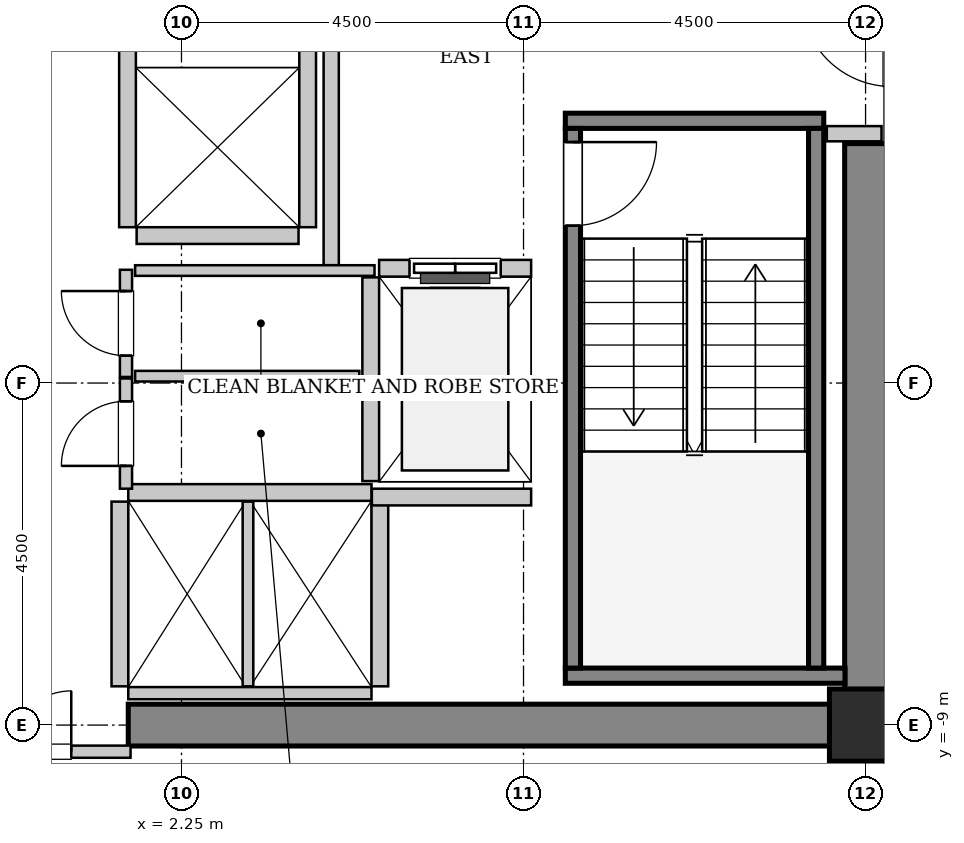
"""IFC4 building model, lengths in metres.
Left out: names, types, materials, properties, quantities, classifications, styles, units other than length and angle.
Written with IfcOpenShell. Run it as: python <this file> out.ifc"""

import sys

from ifc_helpers import new_model, si_unit, direction, frame, frame_2d, origin, origin_2d, place, context, subcontext, project, spatial, rectangle, hollow_rectangle, extrude, source, transform, mapped, element, fill, save


model = new_model("IFC4")
c1 = context("Model", 3, precision=1e-05, world=origin(), true_north=direction((0.0, 1.0)))
c2 = subcontext(c1, "Body", "Model", "MODEL_VIEW")
j1 = project(units=[si_unit("LENGTHUNIT", "METRE"), si_unit("PLANEANGLEUNIT", "RADIAN")], contexts=[c1])
p1 = place(None, origin())
s1 = spatial("IfcSite", under=j1, at=p1, CompositionType="ELEMENT")
p2 = place(p1, origin())
s2 = spatial("IfcBuilding", under=s1, at=p2, CompositionType="ELEMENT")
p3 = place(p2, frame((0.0, 0.0, 94.6)))
s3 = spatial("IfcBuildingStorey", under=s2, at=p3, CompositionType="ELEMENT", Elevation=94.6)
m1 = source(origin(), c2, "Body", "SweptSolid", [
    extrude(rectangle(XDim=9.975, YDim=0.55, at=frame_2d((4.987, 0.0))), origin(), (0.0, 0.0, 1.0), 3.8),
])
p4 = place(p3, frame((1.55, -9.0, 0.0), z_axis=(0.0, 0.0, 1.0), x_axis=(1.0, 0.0, 0.0)))
e1 = element("IfcWall", 1, at=p4, inside=s3, PredefinedType="SHEAR", context=c2, shape_type="MappedRepresentation", body=[
    mapped(m1, transform((0.0, 0.0, 0.0), x_axis=(1.0, 0.0, 0.0), y_axis=(0.0, 1.0, 0.0), z_axis=(0.0, 0.0, 1.0), scale=1.0)),
])
m2 = source(origin(), c2, "Body", "SweptSolid", [
    extrude(rectangle(XDim=7.375, YDim=0.55, at=frame_2d((3.688, 0.0))), origin(), (0.0, 0.0, 1.0), 3.8),
])
p5 = place(p3, frame((11.25, -8.725, 0.0), z_axis=(0.0, 0.0, 1.0), x_axis=(0.0, 1.0, 0.0)))
e2 = element("IfcWall", 2, at=p5, inside=s3, PredefinedType="SHEAR", context=c2, shape_type="MappedRepresentation", body=[
    mapped(m2, transform((0.0, 0.0, 0.0), x_axis=(1.0, 0.0, 0.0), y_axis=(0.0, 1.0, 0.0), z_axis=(0.0, 0.0, 1.0), scale=1.0)),
])
m3 = source(origin(), c2, "Body", "SweptSolid", [
    extrude(hollow_rectangle(XDim=0.95, YDim=0.95, WallThickness=0.045, InnerFilletRadius=0.045, OuterFilletRadius=0.09, at=origin_2d()), origin(), (0.0, 0.0, 1.0), 3.8),
])
p6 = place(p3, frame((11.25, -9.0, 0.0), z_axis=(0.0, 0.0, 1.0), x_axis=(1.0, 0.0, 0.0)))
e3 = element("IfcColumn", 3, at=p6, inside=s3, PredefinedType="COLUMN", context=c2, shape_type="MappedRepresentation", body=[
    mapped(m3, transform((0.0, 0.0, 0.0), x_axis=(1.0, 0.0, 0.0), y_axis=(0.0, 1.0, 0.0), z_axis=(0.0, 0.0, 1.0), scale=1.0)),
])
m4 = source(origin(), c2, "Body", "SweptSolid", [
    extrude(rectangle(XDim=3.4, YDim=0.2, at=frame_2d((1.7, 0.0))), origin(), (0.0, 0.0, 1.0), 3.8),
])
p7 = place(p3, frame((7.3, -1.05, 0.0), z_axis=(0.0, 0.0, 1.0), x_axis=(1.0, 0.0, 0.0)))
e4 = element("IfcWall", 4, at=p7, inside=s3, PredefinedType="SOLIDWALL", context=c2, shape_type="MappedRepresentation", body=[
    mapped(m4, transform((0.0, 0.0, 0.0), x_axis=(1.0, 0.0, 0.0), y_axis=(0.0, 1.0, 0.0), z_axis=(0.0, 0.0, 1.0), scale=1.0)),
])
m5 = source(origin(), c2, "Body", "SweptSolid", [
    extrude(rectangle(XDim=3.68, YDim=0.2, at=frame_2d((1.84, 0.0))), origin(), (0.0, 0.0, 1.0), 3.8),
])
p8 = place(p3, frame((7.3, -8.35, 0.0), z_axis=(0.0, 0.0, 1.0), x_axis=(1.0, 0.0, 0.0)))
e5 = element("IfcWall", 5, at=p8, inside=s3, PredefinedType="SOLIDWALL", context=c2, shape_type="MappedRepresentation", body=[
    mapped(m5, transform((0.0, 0.0, 0.0), x_axis=(1.0, 0.0, 0.0), y_axis=(0.0, 1.0, 0.0), z_axis=(0.0, 0.0, 1.0), scale=1.0)),
])
m6 = source(origin(), c2, "Body", "SweptSolid", [
    extrude(rectangle(XDim=7.1, YDim=0.2, at=frame_2d((3.55, 0.0))), origin(), (0.0, 0.0, 1.0), 3.8),
])
p9 = place(p3, frame((7.4, -1.15, 0.0), z_axis=(0.0, 0.0, 1.0), x_axis=(0.0, -1.0, 0.0)))
e6 = element("IfcWall", 6, at=p9, inside=s3, PredefinedType="SOLIDWALL", context=c2, shape_type="MappedRepresentation", body=[
    mapped(m6, transform((0.0, 0.0, 0.0), x_axis=(1.0, 0.0, 0.0), y_axis=(0.0, 1.0, 0.0), z_axis=(0.0, 0.0, 1.0), scale=1.0)),
])
p10 = place(p9, frame((0.18, 0.0, 0.0)))
e7 = element("IfcOpeningElement", 7, at=p10, cuts=e6, PredefinedType="OPENING", context=c2, shape_type="SweptSolid", body=[
    extrude(rectangle(XDim=1.1, YDim=2.15, at=frame_2d((0.55, 1.075))), frame((0.0, 0.11, 0.0), z_axis=(0.0, -1.0, 0.0), x_axis=(1.0, 0.0, 0.0)), (0.0, 0.0, 1.0), 0.22),
])
p11 = place(p3, frame((10.6, -1.15, 0.0), z_axis=(0.0, 0.0, 1.0), x_axis=(0.0, -1.0, 0.0)))
e8 = element("IfcWall", 8, at=p11, inside=s3, PredefinedType="SOLIDWALL", context=c2, shape_type="MappedRepresentation", body=[
    mapped(m6, transform((0.0, 0.0, 0.0), x_axis=(1.0, 0.0, 0.0), y_axis=(0.0, 1.0, 0.0), z_axis=(0.0, 0.0, 1.0), scale=1.0)),
])
m7 = source(origin(), c2, "Body", "SweptSolid", [
    extrude(rectangle(XDim=2.0, YDim=0.22, at=frame_2d((1.0, 0.0))), origin(), (0.0, 0.0, 1.0), 3.535),
])
p12 = place(p3, frame((6.85, -2.99, 0.0), z_axis=(0.0, 0.0, 1.0), x_axis=(-1.0, 0.0, 0.0)))
e9 = element("IfcWall", 9, at=p12, inside=s3, PredefinedType="SOLIDWALL", context=c2, shape_type="MappedRepresentation", body=[
    mapped(m7, transform((0.0, 0.0, 0.0), x_axis=(1.0, 0.0, 0.0), y_axis=(0.0, 1.0, 0.0), z_axis=(0.0, 0.0, 1.0), scale=1.0)),
])
p13 = place(p12, frame((0.4, 0.0, 0.0)))
e10 = element("IfcOpeningElement", 10, at=p13, cuts=e9, PredefinedType="OPENING", context=c2, shape_type="SweptSolid", body=[
    extrude(rectangle(XDim=1.2, YDim=2.2, at=frame_2d((0.6, 1.1))), frame((0.0, 0.12, 0.0), z_axis=(0.0, -1.0, 0.0), x_axis=(1.0, 0.0, 0.0)), (0.0, 0.0, 1.0), 0.24),
])
m8 = source(origin(), c2, "Body", "SweptSolid", [
    extrude(rectangle(XDim=2.68, YDim=0.22, at=frame_2d((1.34, 0.0))), origin(), (0.0, 0.0, 1.0), 3.535),
])
p14 = place(p3, frame((4.74, -3.11, 0.0), z_axis=(0.0, 0.0, 1.0), x_axis=(0.0, -1.0, 0.0)))
e11 = element("IfcWall", 11, at=p14, inside=s3, PredefinedType="SOLIDWALL", context=c2, shape_type="MappedRepresentation", body=[
    mapped(m8, transform((0.0, 0.0, 0.0), x_axis=(1.0, 0.0, 0.0), y_axis=(0.0, 1.0, 0.0), z_axis=(0.0, 0.0, 1.0), scale=1.0)),
])
m9 = source(origin(), c2, "Body", "SweptSolid", [
    extrude(rectangle(XDim=3.2, YDim=0.22, at=frame_2d((1.6, 0.0))), origin(), (0.0, 0.0, 1.0), 3.535),
])
p15 = place(p3, frame((4.75, -5.94, 0.0), z_axis=(0.0, 0.0, 1.0), x_axis=(-1.0, 0.0, 0.0)))
e12 = element("IfcWall", 12, at=p15, inside=s3, PredefinedType="SOLIDWALL", context=c2, shape_type="MappedRepresentation", body=[
    mapped(m9, transform((0.0, 0.0, 0.0), x_axis=(1.0, 0.0, 0.0), y_axis=(0.0, 1.0, 0.0), z_axis=(0.0, 0.0, 1.0), scale=1.0)),
])
m10 = source(origin(), c2, "Body", "SweptSolid", [
    extrude(rectangle(XDim=3.2, YDim=0.16, at=frame_2d((1.6, 0.0))), origin(), (0.0, 0.0, 1.0), 2.425),
])
p16 = place(p3, frame((1.55, -8.58, 0.0), z_axis=(0.0, 0.0, 1.0), x_axis=(1.0, 0.0, 0.0)))
e13 = element("IfcWall", 13, at=p16, inside=s3, PredefinedType="PARTITIONING", context=c2, shape_type="MappedRepresentation", body=[
    mapped(m10, transform((0.0, 0.0, 0.0), x_axis=(1.0, 0.0, 0.0), y_axis=(0.0, 1.0, 0.0), z_axis=(0.0, 0.0, 1.0), scale=1.0)),
])
m11 = source(origin(), c2, "Body", "SweptSolid", [
    extrude(rectangle(XDim=2.43, YDim=0.22, at=frame_2d((1.215, 0.0))), origin(), (0.0, 0.0, 1.0), 3.535),
])
p17 = place(p3, frame((1.44, -6.06, 0.0), z_axis=(0.0, 0.0, 1.0), x_axis=(0.0, -1.0, 0.0)))
e14 = element("IfcWall", 14, at=p17, inside=s3, PredefinedType="SOLIDWALL", context=c2, shape_type="MappedRepresentation", body=[
    mapped(m11, transform((0.0, 0.0, 0.0), x_axis=(1.0, 0.0, 0.0), y_axis=(0.0, 1.0, 0.0), z_axis=(0.0, 0.0, 1.0), scale=1.0)),
])
m12 = source(origin(), c2, "Body", "SweptSolid", [
    extrude(rectangle(XDim=2.43, YDim=0.14, at=frame_2d((1.215, 0.0))), origin(), (0.0, 0.0, 1.0), 3.535),
])
p18 = place(p3, frame((3.125, -8.49, 0.0), z_axis=(0.0, 0.0, 1.0), x_axis=(0.0, 1.0, 0.0)))
e15 = element("IfcWall", 15, at=p18, inside=s3, PredefinedType="PARTITIONING", context=c2, shape_type="MappedRepresentation", body=[
    mapped(m12, transform((0.0, 0.0, 0.0), x_axis=(1.0, 0.0, 0.0), y_axis=(0.0, 1.0, 0.0), z_axis=(0.0, 0.0, 1.0), scale=1.0)),
])
p19 = place(p3, frame((4.86, -8.49, 0.0), z_axis=(0.0, 0.0, 1.0), x_axis=(0.0, 1.0, 0.0)))
e16 = element("IfcWall", 16, at=p19, inside=s3, PredefinedType="SOLIDWALL", context=c2, shape_type="MappedRepresentation", body=[
    mapped(m11, transform((0.0, 0.0, 0.0), x_axis=(1.0, 0.0, 0.0), y_axis=(0.0, 1.0, 0.0), z_axis=(0.0, 0.0, 1.0), scale=1.0)),
])
m13 = source(origin(), c2, "Body", "SweptSolid", [
    extrude(rectangle(XDim=4.9, YDim=0.22, at=frame_2d((2.45, 0.0))), origin(), (0.0, 0.0, 1.0), 3.535),
])
for number, where, z_axis, x_axis in (
    (17, (1.54, 2.45, 0.0), (0.0, 0.0, 1.0), (0.0, -1.0, 0.0)),
    (18, (3.91, -2.45, 0.0), (0.0, 0.0, 1.0), (0.0, 1.0, 0.0)),
):
    element("IfcWall", number, at=place(p3, frame(where, z_axis=z_axis, x_axis=x_axis)), inside=s3, PredefinedType="SOLIDWALL", context=c2, shape_type="MappedRepresentation", body=[
        mapped(m13, transform((0.0, 0.0, 0.0), x_axis=(1.0, 0.0, 0.0), y_axis=(0.0, 1.0, 0.0), z_axis=(0.0, 0.0, 1.0), scale=1.0)),
    ])
m14 = source(origin(), c2, "Body", "SweptSolid", [
    extrude(rectangle(XDim=2.13, YDim=0.22, at=frame_2d((1.065, 0.0))), origin(), (0.0, 0.0, 1.0), 3.535),
])
p20 = place(p3, frame((1.66, -2.56, 0.0), z_axis=(0.0, 0.0, 1.0), x_axis=(1.0, 0.0, 0.0)))
e19 = element("IfcWall", 19, at=p20, inside=s3, PredefinedType="SOLIDWALL", context=c2, shape_type="MappedRepresentation", body=[
    mapped(m14, transform((0.0, 0.0, 0.0), x_axis=(1.0, 0.0, 0.0), y_axis=(0.0, 1.0, 0.0), z_axis=(0.0, 0.0, 1.0), scale=1.0)),
])
m15 = source(origin(), c2, "Body", "SweptSolid", [
    extrude(rectangle(XDim=2.095, YDim=0.22, at=frame_2d((1.048, 0.0))), origin(), (0.0, 0.0, 1.0), 3.535),
])
p21 = place(p3, frame((4.755, -6.0, 0.0), z_axis=(0.0, 0.0, 1.0), x_axis=(1.0, 0.0, 0.0)))
e20 = element("IfcWall", 20, at=p21, inside=s3, PredefinedType="SOLIDWALL", context=c2, shape_type="MappedRepresentation", body=[
    mapped(m15, transform((0.0, 0.0, 0.0), x_axis=(1.0, 0.0, 0.0), y_axis=(0.0, 1.0, 0.0), z_axis=(0.0, 0.0, 1.0), scale=1.0)),
])
m16 = source(origin(), c2, "Body", "SweptSolid", [
    extrude(rectangle(XDim=5.9, YDim=0.2, at=frame_2d((2.95, 0.0))), origin(), (0.0, 0.0, 1.0), 3.535),
])
p22 = place(p3, frame((4.22, -2.95, 0.0), z_axis=(0.0, 0.0, 1.0), x_axis=(0.0, 1.0, 0.0)))
e21 = element("IfcWall", 21, at=p22, inside=s3, PredefinedType="PARTITIONING", context=c2, shape_type="MappedRepresentation", body=[
    mapped(m16, transform((0.0, 0.0, 0.0), x_axis=(1.0, 0.0, 0.0), y_axis=(0.0, 1.0, 0.0), z_axis=(0.0, 0.0, 1.0), scale=1.0)),
])
m17 = source(origin(), c2, "Body", "SweptSolid", [
    extrude(rectangle(XDim=0.72, YDim=0.2, at=frame_2d((0.36, 0.0))), origin(), (0.0, 0.0, 1.0), 3.535),
])
p23 = place(p3, frame((10.74, -1.22, 0.0), z_axis=(0.0, 0.0, 1.0), x_axis=(1.0, 0.0, 0.0)))
e22 = element("IfcWall", 22, at=p23, inside=s3, PredefinedType="PARTITIONING", context=c2, shape_type="MappedRepresentation", body=[
    mapped(m17, transform((0.0, 0.0, 0.0), x_axis=(1.0, 0.0, 0.0), y_axis=(0.0, 1.0, 0.0), z_axis=(0.0, 0.0, 1.0), scale=1.0)),
])
m18 = source(origin(), c2, "Body", "SweptSolid", [
    extrude(rectangle(XDim=3.16, YDim=0.16, at=frame_2d((1.58, 0.0))), origin(), (0.0, 0.0, 1.0), 2.425),
])
p24 = place(p3, frame((-1.58, -9.35, 0.0), z_axis=(0.0, 0.0, 1.0), x_axis=(1.0, 0.0, 0.0)))
e23 = element("IfcWall", 23, at=p24, inside=s3, PredefinedType="PARTITIONING", context=c2, shape_type="MappedRepresentation", body=[
    mapped(m18, transform((0.0, 0.0, 0.0), x_axis=(1.0, 0.0, 0.0), y_axis=(0.0, 1.0, 0.0), z_axis=(0.0, 0.0, 1.0), scale=1.0)),
])
p25 = place(p24, frame((0.78, 0.0, 0.0)))
e24 = element("IfcOpeningElement", 24, at=p25, cuts=e23, PredefinedType="OPENING", context=c2, shape_type="SweptSolid", body=[
    extrude(rectangle(XDim=1.6, YDim=2.3, at=frame_2d((0.8, 1.15))), frame((0.0, 0.09, 0.0), z_axis=(0.0, -1.0, 0.0), x_axis=(1.0, 0.0, 0.0)), (0.0, 0.0, 1.0), 0.18),
])
m19 = source(origin(), c2, "Body", "SweptSolid", [
    extrude(rectangle(XDim=1.41, YDim=0.16, at=frame_2d((0.705, 0.0))), origin(), (0.0, 0.0, 1.0), 3.535),
])
p26 = place(p3, frame((1.52, -4.42, 0.0), z_axis=(0.0, 0.0, 1.0), x_axis=(0.0, 1.0, 0.0)))
e25 = element("IfcWall", 25, at=p26, inside=s3, PredefinedType="PARTITIONING", context=c2, shape_type="MappedRepresentation", body=[
    mapped(m19, transform((0.0, 0.0, 0.0), x_axis=(1.0, 0.0, 0.0), y_axis=(0.0, 1.0, 0.0), z_axis=(0.0, 0.0, 1.0), scale=1.0)),
])
p27 = place(p26, frame((0.28, 0.0, 0.0)))
e26 = element("IfcOpeningElement", 26, at=p27, cuts=e25, PredefinedType="OPENING", context=c2, shape_type="SweptSolid", body=[
    extrude(rectangle(XDim=0.85, YDim=2.1, at=frame_2d((0.425, 1.05))), frame((0.0, 0.09, 0.0), z_axis=(0.0, -1.0, 0.0), x_axis=(1.0, 0.0, 0.0)), (0.0, 0.0, 1.0), 0.18),
])
m20 = source(origin(), c2, "Body", "SweptSolid", [
    extrude(rectangle(XDim=3.15, YDim=0.14, at=frame_2d((1.575, 0.0))), origin(), (0.0, 0.0, 1.0), 3.535),
])
p28 = place(p3, frame((1.64, -3.02, 0.0), z_axis=(0.0, 0.0, 1.0), x_axis=(1.0, 0.0, 0.0)))
e27 = element("IfcWall", 27, at=p28, inside=s3, PredefinedType="PARTITIONING", context=c2, shape_type="MappedRepresentation", body=[
    mapped(m20, transform((0.0, 0.0, 0.0), x_axis=(1.0, 0.0, 0.0), y_axis=(0.0, 1.0, 0.0), z_axis=(0.0, 0.0, 1.0), scale=1.0)),
])
m21 = source(origin(), c2, "Body", "SweptSolid", [
    extrude(rectangle(XDim=2.95, YDim=0.14, at=frame_2d((1.475, 0.0))), origin(), (0.0, 0.0, 1.0), 3.535),
])
p29 = place(p3, frame((1.64, -4.41, 0.0), z_axis=(0.0, 0.0, 1.0), x_axis=(1.0, 0.0, 0.0)))
e28 = element("IfcWall", 28, at=p29, inside=s3, PredefinedType="PARTITIONING", context=c2, shape_type="MappedRepresentation", body=[
    mapped(m21, transform((0.0, 0.0, 0.0), x_axis=(1.0, 0.0, 0.0), y_axis=(0.0, 1.0, 0.0), z_axis=(0.0, 0.0, 1.0), scale=1.0)),
])
m22 = source(origin(), c2, "Body", "SweptSolid", [
    extrude(rectangle(XDim=1.45, YDim=0.16, at=frame_2d((0.725, 0.0))), origin(), (0.0, 0.0, 1.0), 3.535),
])
p30 = place(p3, frame((1.52, -5.89, 0.0), z_axis=(0.0, 0.0, 1.0), x_axis=(0.0, 1.0, 0.0)))
e29 = element("IfcWall", 29, at=p30, inside=s3, PredefinedType="PARTITIONING", context=c2, shape_type="MappedRepresentation", body=[
    mapped(m22, transform((0.0, 0.0, 0.0), x_axis=(1.0, 0.0, 0.0), y_axis=(0.0, 1.0, 0.0), z_axis=(0.0, 0.0, 1.0), scale=1.0)),
])
p31 = place(p30, frame((0.3, 0.0, 0.0)))
e30 = element("IfcOpeningElement", 30, at=p31, cuts=e29, PredefinedType="OPENING", context=c2, shape_type="SweptSolid", body=[
    extrude(rectangle(XDim=0.85, YDim=2.1, at=frame_2d((0.425, 1.05))), frame((0.0, 0.09, 0.0), z_axis=(0.0, -1.0, 0.0), x_axis=(1.0, 0.0, 0.0)), (0.0, 0.0, 1.0), 0.18),
])
m23 = source(origin(), c2, "Body", "SweptSolid", [
    extrude(rectangle(XDim=1.1, YDim=2.15, at=frame_2d((0.55, 1.075))), frame((0.0, 0.025, 0.0), z_axis=(0.0, -1.0, 0.0), x_axis=(1.0, 0.0, 0.0)), (0.0, 0.0, 1.0), 0.05),
])
p32 = place(p10, origin())
e31 = element("IfcDoor", 31, at=p32, inside=s3, OperationType="SINGLE_SWING_LEFT", PredefinedType="DOOR", context=c2, shape_type="MappedRepresentation", body=[
    mapped(m23, transform((0.0, 0.0, 0.0), x_axis=(1.0, 0.0, 0.0), y_axis=(0.0, 1.0, 0.0), z_axis=(0.0, 0.0, 1.0), scale=1.0)),
])
fill(e7, e31)
m24 = source(origin(), c2, "Body", "SweptSolid", [
    extrude(rectangle(XDim=1.2, YDim=2.2, at=frame_2d((0.6, 1.1))), frame((0.0, 0.025, 0.0), z_axis=(0.0, -1.0, 0.0), x_axis=(1.0, 0.0, 0.0)), (0.0, 0.0, 1.0), 0.05),
])
p33 = place(p13, origin())
e32 = element("IfcDoor", 32, at=p33, inside=s3, OperationType="SLIDING_TO_LEFT", PredefinedType="DOOR", context=c2, shape_type="MappedRepresentation", body=[
    mapped(m24, transform((0.0, 0.0, 0.0), x_axis=(1.0, 0.0, 0.0), y_axis=(0.0, 1.0, 0.0), z_axis=(0.0, 0.0, 1.0), scale=1.0)),
])
fill(e10, e32)
m25 = source(origin(), c2, "Body", "SweptSolid", [
    extrude(rectangle(XDim=1.6, YDim=2.3, at=frame_2d((0.8, 1.15))), frame((0.0, 0.025, 0.0), z_axis=(0.0, -1.0, 0.0), x_axis=(1.0, 0.0, 0.0)), (0.0, 0.0, 1.0), 0.05),
])
p34 = place(p25, origin())
e33 = element("IfcDoor", 33, at=p34, inside=s3, OperationType="DOUBLE_DOOR_SINGLE_SWING", PredefinedType="DOOR", context=c2, shape_type="MappedRepresentation", body=[
    mapped(m25, transform((0.0, 0.0, 0.0), x_axis=(1.0, 0.0, 0.0), y_axis=(0.0, 1.0, 0.0), z_axis=(0.0, 0.0, 1.0), scale=1.0)),
])
fill(e24, e33)
m26 = source(origin(), c2, "Body", "SweptSolid", [
    extrude(rectangle(XDim=0.85, YDim=2.1, at=frame_2d((0.425, 1.05))), frame((0.0, 0.025, 0.0), z_axis=(0.0, -1.0, 0.0), x_axis=(1.0, 0.0, 0.0)), (0.0, 0.0, 1.0), 0.05),
])
p35 = place(p27, origin())
e34 = element("IfcDoor", 34, at=p35, inside=s3, OperationType="SINGLE_SWING_RIGHT", PredefinedType="DOOR", context=c2, shape_type="MappedRepresentation", body=[
    mapped(m26, transform((0.0, 0.0, 0.0), x_axis=(1.0, 0.0, 0.0), y_axis=(0.0, 1.0, 0.0), z_axis=(0.0, 0.0, 1.0), scale=1.0)),
])
fill(e26, e34)
p36 = place(p31, origin())
e35 = element("IfcDoor", 35, at=p36, inside=s3, OperationType="SINGLE_SWING_LEFT", PredefinedType="DOOR", context=c2, shape_type="MappedRepresentation", body=[
    mapped(m26, transform((0.0, 0.0, 0.0), x_axis=(1.0, 0.0, 0.0), y_axis=(0.0, 1.0, 0.0), z_axis=(0.0, 0.0, 1.0), scale=1.0)),
])
fill(e30, e35)
save(model, sys.argv[1])
